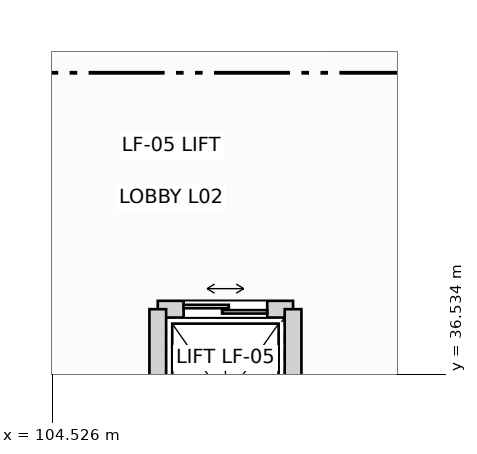
"""IFC4 building model, lengths in metres.
Left out: names, types, materials, properties, quantities, classifications, styles, units other than length and angle.
Written with IfcOpenShell. Run it as: python <this file> out.ifc"""

import sys

from ifc_helpers import new_model, si_unit, direction, frame, frame_2d, origin, place, context, subcontext, project, spatial, rectangle, extrude, element, fill, save


model = new_model("IFC4")
c1 = context("Model", 3, precision=1e-05, world=origin(), true_north=direction((0.0, 1.0)))
c2 = subcontext(c1, "Body", "Model", "MODEL_VIEW")
j1 = project(units=[si_unit("LENGTHUNIT", "METRE"), si_unit("PLANEANGLEUNIT", "RADIAN")], contexts=[c1])
p1 = place(None, origin())
s1 = spatial("IfcSite", under=j1, at=p1, CompositionType="ELEMENT")
p2 = place(p1, origin())
s2 = spatial("IfcBuilding", under=s1, at=p2, CompositionType="ELEMENT")
p3 = place(p2, frame((0.0, 0.0, 11.4)))
s3 = spatial("IfcBuildingStorey", under=s2, at=p3, CompositionType="ELEMENT", Elevation=11.4)
p4 = place(p3, frame((105.91, 37.39, 0.0), z_axis=(0.0, 0.0, 1.0), x_axis=(1.0, 0.0, 0.0)))
e1 = element("IfcWall", 1, at=p4, inside=s3, PredefinedType="PARTITIONING", context=c2, shape_type="SweptSolid", body=[
    extrude(rectangle(XDim=1.78, YDim=0.22, at=frame_2d((0.89, 0.0))), origin(), (0.0, 0.0, 1.0), 5.055),
])
p5 = place(p4, frame((0.34, 0.0, 0.0)))
e2 = element("IfcOpeningElement", 2, at=p5, cuts=e1, PredefinedType="OPENING", context=c2, shape_type="SweptSolid", body=[
    extrude(rectangle(XDim=1.1, YDim=2.18, at=frame_2d((0.55, 1.09))), frame((0.0, 0.12, 0.0), z_axis=(0.0, -1.0, 0.0), x_axis=(1.0, 0.0, 0.0)), (0.0, 0.0, 1.0), 0.24),
])
for number, where, z_axis, x_axis in (
    (3, (105.91, 35.01, 0.0), (0.0, 0.0, 1.0), (0.0, 1.0, 0.0)),
    (4, (107.69, 35.01, 0.0), (0.0, 0.0, 1.0), (0.0, 1.0, 0.0)),
):
    element("IfcWall", number, at=place(p3, frame(where, z_axis=z_axis, x_axis=x_axis)), inside=s3, PredefinedType="PARTITIONING", context=c2, shape_type="SweptSolid", body=[
        extrude(rectangle(XDim=2.38, YDim=0.22, at=frame_2d((1.19, 0.0))), origin(), (0.0, 0.0, 1.0), 4.605),
    ])
p6 = place(p5, origin())
e5 = element("IfcDoor", 5, at=p6, inside=s3, OperationType="DOUBLE_DOOR_SLIDING", PredefinedType="DOOR", context=c2, shape_type="SweptSolid", body=[
    extrude(rectangle(XDim=1.1, YDim=2.18, at=frame_2d((0.55, 1.09))), frame((0.0, 0.025, 0.0), z_axis=(0.0, -1.0, 0.0), x_axis=(1.0, 0.0, 0.0)), (0.0, 0.0, 1.0), 0.05),
])
fill(e2, e5)
save(model, sys.argv[1])
